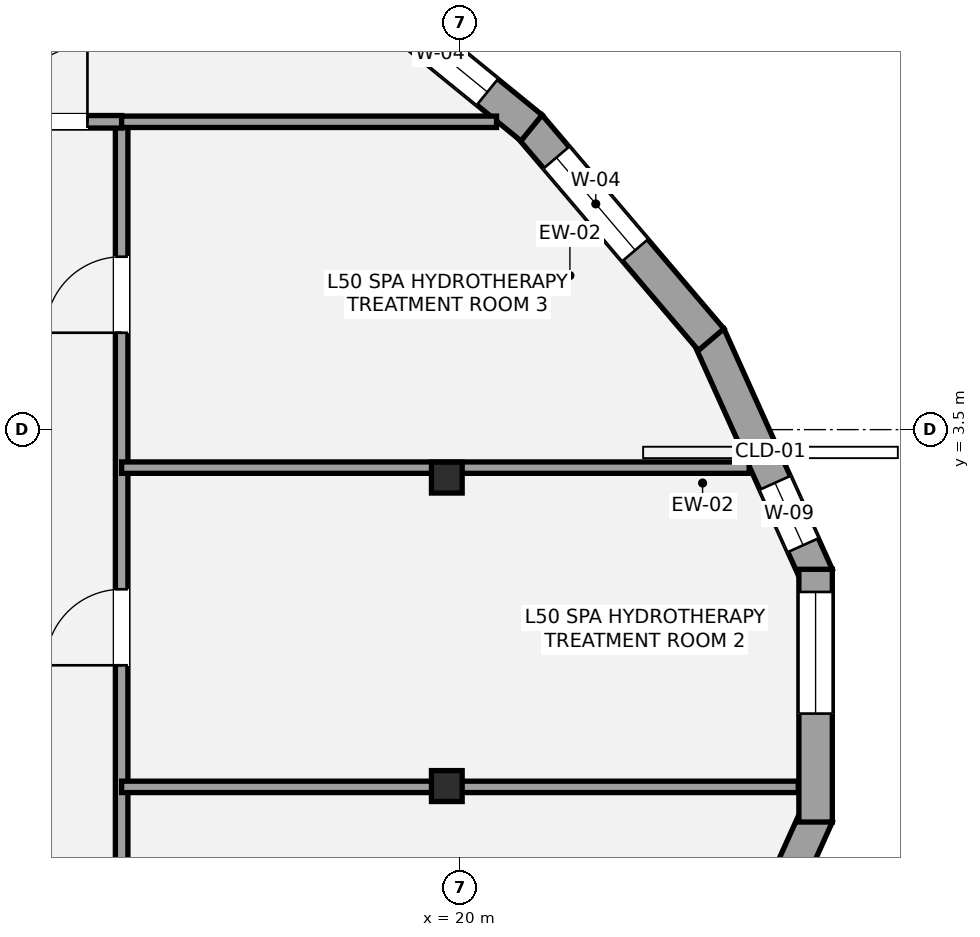
"""IFC4 building model, lengths in metres.
Left out: names, types, materials, properties, quantities, classifications, styles, units other than length and angle.
Written with IfcOpenShell. Run it as: python <this file> out.ifc"""

import sys

from ifc_helpers import new_model, si_unit, direction, frame, frame_2d, origin, origin_2d, place, context, subcontext, project, spatial, rectangle, i_section, extrude, element, fill, save


model = new_model("IFC4")
c1 = context("Model", 3, precision=1e-05, world=origin(), true_north=direction((0.0, 1.0)))
c2 = subcontext(c1, "Body", "Model", "MODEL_VIEW")
j1 = project(units=[si_unit("LENGTHUNIT", "METRE"), si_unit("PLANEANGLEUNIT", "RADIAN")], contexts=[c1])
p1 = place(None, origin())
s1 = spatial("IfcSite", under=j1, at=p1, CompositionType="ELEMENT")
p2 = place(p1, origin())
s2 = spatial("IfcBuilding", under=s1, at=p2, CompositionType="ELEMENT")
p3 = place(p2, frame((0.0, 0.0, 182.2)))
s3 = spatial("IfcBuildingStorey", under=s2, at=p3, CompositionType="ELEMENT", Elevation=182.2)
for number, where, z_axis, x_axis in (
    (1, (19.828, 2.869, 0.0), (0.0, 0.0, 1.0), (1.0, 0.0, 0.0)),
    (2, (19.828, -1.189, 0.0), (0.0, 0.0, 1.0), (1.0, 0.0, 0.0)),
):
    element("IfcColumn", number, at=place(p3, frame(where, z_axis=z_axis, x_axis=x_axis)), inside=s3, PredefinedType="COLUMN", context=c2, shape_type="SweptSolid", body=[
        extrude(i_section(OverallWidth=0.404, OverallDepth=0.407, WebThickness=0.027, FlangeThickness=0.044, at=origin_2d()), origin(), (0.0, 0.0, 1.0), 3.2),
    ])
p4 = place(p3, frame((23.274, 4.737, 0.0), z_axis=(0.0, 0.0, 1.0), x_axis=(0.410812065386, -0.911720048553, 0.0)))
e3 = element("IfcWall", 3, at=p4, inside=s3, PredefinedType="STANDARD", context=c2, shape_type="SweptSolid", body=[
    extrude(rectangle(XDim=3.471, YDim=0.44, at=frame_2d((1.736, 0.0))), origin(), (0.0, 0.0, 1.0), 2.315),
])
p5 = place(p4, frame((2.125, 0.0, 0.58)))
e4 = element("IfcOpeningElement", 4, at=p5, cuts=e3, PredefinedType="OPENING", context=c2, shape_type="SweptSolid", body=[
    extrude(rectangle(XDim=0.9, YDim=1.35, at=frame_2d((0.45, 0.675))), frame((0.0, 0.23, 0.0), z_axis=(0.0, -1.0, 0.0), x_axis=(1.0, 0.0, 0.0)), (0.0, 0.0, 1.0), 0.46),
])
p6 = place(p3, frame((20.914, 7.497, 0.0), z_axis=(0.0, 0.0, 1.0), x_axis=(0.648014991522, -0.761627580096, 0.0)))
e5 = element("IfcWall", 5, at=p6, inside=s3, PredefinedType="STANDARD", context=c2, shape_type="SweptSolid", body=[
    extrude(rectangle(XDim=3.692, YDim=0.44, at=frame_2d((1.846, 0.0))), origin(), (0.0, 0.0, 1.0), 2.315),
])
p7 = place(p6, frame((0.548, 0.0, 0.58)))
e6 = element("IfcOpeningElement", 6, at=p7, cuts=e5, PredefinedType="OPENING", context=c2, shape_type="SweptSolid", body=[
    extrude(rectangle(XDim=1.6, YDim=1.55, at=frame_2d((0.8, 0.775))), frame((0.0, 0.23, 0.0), z_axis=(0.0, -1.0, 0.0), x_axis=(1.0, 0.0, 0.0)), (0.0, 0.0, 1.0), 0.46),
])
p8 = place(p3, frame((17.96, 9.899, 0.0), z_axis=(0.0, 0.0, 1.0), x_axis=(0.77522232587, -0.631688487684, 0.0)))
e7 = element("IfcWall", 7, at=p8, inside=s3, PredefinedType="STANDARD", context=c2, shape_type="SweptSolid", body=[
    extrude(rectangle(XDim=3.847, YDim=0.44, at=frame_2d((1.924, 0.0))), origin(), (0.0, 0.0, 1.0), 2.315),
])
p9 = place(p8, frame((1.498, 0.0, 0.58)))
e8 = element("IfcOpeningElement", 8, at=p9, cuts=e7, PredefinedType="OPENING", context=c2, shape_type="SweptSolid", body=[
    extrude(rectangle(XDim=1.6, YDim=1.55, at=frame_2d((0.8, 0.775))), frame((0.0, 0.23, 0.0), z_axis=(0.0, -1.0, 0.0), x_axis=(1.0, 0.0, 0.0)), (0.0, 0.0, 1.0), 0.46),
])
p10 = place(p3, frame((24.7, -1.572, 0.0), z_axis=(0.0, 0.0, 1.0), x_axis=(-0.410812065386, -0.911720048553, 0.0)))
e9 = element("IfcWall", 9, at=p10, inside=s3, PredefinedType="STANDARD", context=c2, shape_type="SweptSolid", body=[
    extrude(rectangle(XDim=3.471, YDim=0.44, at=frame_2d((1.736, 0.0))), origin(), (0.0, 0.0, 1.0), 2.315),
])
p11 = place(p10, frame((1.426, 0.0, 0.58)))
e10 = element("IfcOpeningElement", 10, at=p11, cuts=e9, PredefinedType="OPENING", context=c2, shape_type="SweptSolid", body=[
    extrude(rectangle(XDim=1.6, YDim=1.55, at=frame_2d((0.8, 0.775))), frame((0.0, 0.23, 0.0), z_axis=(0.0, -1.0, 0.0), x_axis=(1.0, 0.0, 0.0)), (0.0, 0.0, 1.0), 0.46),
])
p12 = place(p3, frame((24.68, 1.663, 0.0), z_axis=(0.0, 0.0, 1.0), x_axis=(0.0, -1.0, 0.0)))
e11 = element("IfcWall", 11, at=p12, inside=s3, PredefinedType="STANDARD", context=c2, shape_type="SweptSolid", body=[
    extrude(rectangle(XDim=3.325, YDim=0.44, at=frame_2d((1.663, 0.0))), origin(), (0.0, 0.0, 1.0), 2.315),
])
p13 = place(p12, frame((0.298, 0.0, 0.58)))
e12 = element("IfcOpeningElement", 12, at=p13, cuts=e11, PredefinedType="OPENING", context=c2, shape_type="SweptSolid", body=[
    extrude(rectangle(XDim=1.6, YDim=1.55, at=frame_2d((0.8, 0.775))), frame((0.0, 0.23, 0.0), z_axis=(0.0, -1.0, 0.0), x_axis=(1.0, 0.0, 0.0)), (0.0, 0.0, 1.0), 0.46),
])
p14 = place(p3, frame((15.55, -11.257, 0.0), z_axis=(0.0, 0.0, 1.0), x_axis=(0.0, 1.0, 0.0)))
e13 = element("IfcWall", 13, at=p14, inside=s3, PredefinedType="PARTITIONING", context=c2, shape_type="SweptSolid", body=[
    extrude(rectangle(XDim=18.807, YDim=0.165, at=frame_2d((9.403, 0.0))), origin(), (0.0, 0.0, 1.0), 2.473),
])
p15 = place(p14, frame((4.106, 0.0, 0.0)))
e14 = element("IfcOpeningElement", 14, at=p15, cuts=e13, PredefinedType="OPENING", context=c2, shape_type="SweptSolid", body=[
    extrude(rectangle(XDim=0.85, YDim=2.1, at=frame_2d((0.425, 1.05))), frame((0.0, 0.093, 0.0), z_axis=(0.0, -1.0, 0.0), x_axis=(1.0, 0.0, 0.0)), (0.0, 0.0, 1.0), 0.185),
])
p16 = place(p14, frame((7.257, 0.0, 0.0)))
e15 = element("IfcOpeningElement", 15, at=p16, cuts=e13, PredefinedType="OPENING", context=c2, shape_type="SweptSolid", body=[
    extrude(rectangle(XDim=1.0, YDim=2.15, at=frame_2d((0.5, 1.075))), frame((0.0, 0.093, 0.0), z_axis=(0.0, -1.0, 0.0), x_axis=(1.0, 0.0, 0.0)), (0.0, 0.0, 1.0), 0.185),
])
p17 = place(p14, frame((11.656, 0.0, 0.0)))
e16 = element("IfcOpeningElement", 16, at=p17, cuts=e13, PredefinedType="OPENING", context=c2, shape_type="SweptSolid", body=[
    extrude(rectangle(XDim=1.0, YDim=2.15, at=frame_2d((0.5, 1.075))), frame((0.0, 0.093, 0.0), z_axis=(0.0, -1.0, 0.0), x_axis=(1.0, 0.0, 0.0)), (0.0, 0.0, 1.0), 0.185),
])
p18 = place(p14, frame((16.031, 0.0, 0.0)))
e17 = element("IfcOpeningElement", 17, at=p18, cuts=e13, PredefinedType="OPENING", context=c2, shape_type="SweptSolid", body=[
    extrude(rectangle(XDim=1.0, YDim=2.15, at=frame_2d((0.5, 1.075))), frame((0.0, 0.093, 0.0), z_axis=(0.0, -1.0, 0.0), x_axis=(1.0, 0.0, 0.0)), (0.0, 0.0, 1.0), 0.185),
])
p19 = place(p3, frame((13.8, 7.55, 0.0), z_axis=(0.0, 0.0, 1.0), x_axis=(1.0, 0.0, 0.0)))
e18 = element("IfcWall", 18, at=p19, inside=s3, PredefinedType="PARTITIONING", context=c2, shape_type="SweptSolid", body=[
    extrude(rectangle(XDim=1.75, YDim=0.165, at=frame_2d((0.875, 0.0))), origin(), (0.0, 0.0, 1.0), 3.02),
])
p20 = place(p19, frame((0.3, 0.0, 0.0)))
e19 = element("IfcOpeningElement", 19, at=p20, cuts=e18, PredefinedType="OPENING", context=c2, shape_type="SweptSolid", body=[
    extrude(rectangle(XDim=1.0, YDim=2.15, at=frame_2d((0.5, 1.075))), frame((0.0, 0.093, 0.0), z_axis=(0.0, -1.0, 0.0), x_axis=(1.0, 0.0, 0.0)), (0.0, 0.0, 1.0), 0.185),
])
p21 = place(p3, frame((15.55, 7.55, 0.0), z_axis=(0.0, 0.0, 1.0), x_axis=(1.0, 0.0, 0.0)))
e20 = element("IfcWall", 20, at=p21, inside=s3, PredefinedType="PLUMBINGWALL", context=c2, shape_type="SweptSolid", body=[
    extrude(rectangle(XDim=4.932, YDim=0.15, at=frame_2d((2.466, 0.0))), origin(), (0.0, 0.0, 1.0), 2.473),
])
p22 = place(p3, frame((15.55, -1.2, 0.0), z_axis=(0.0, 0.0, 1.0), x_axis=(1.0, 0.0, 0.0)))
e21 = element("IfcWall", 21, at=p22, inside=s3, PredefinedType="PLUMBINGWALL", context=c2, shape_type="SweptSolid", body=[
    extrude(rectangle(XDim=8.902, YDim=0.15, at=frame_2d((4.451, 0.0))), origin(), (0.0, 0.0, 1.0), 2.398),
])
p23 = place(p3, frame((15.55, 3.0, 0.0), z_axis=(0.0, 0.0, 1.0), x_axis=(1.0, 0.0, 0.0)))
e22 = element("IfcWall", 22, at=p23, inside=s3, PredefinedType="PLUMBINGWALL", context=c2, shape_type="SweptSolid", body=[
    extrude(rectangle(XDim=8.256, YDim=0.15, at=frame_2d((4.128, 0.0))), origin(), (0.0, 0.0, 1.0), 2.473),
])
p24 = place(p5, origin())
e23 = element("IfcWindow", 23, at=p24, inside=s3, PartitioningType="SINGLE_PANEL", PredefinedType="WINDOW", context=c2, shape_type="SweptSolid", body=[
    extrude(rectangle(XDim=0.9, YDim=1.35, at=frame_2d((0.45, 0.675))), frame((0.0, -0.01, 0.0), z_axis=(0.0, -1.0, 0.0), x_axis=(1.0, 0.0, 0.0)), (0.0, 0.0, 1.0), 0.06),
])
fill(e4, e23)
p25 = place(p7, origin())
e24 = element("IfcWindow", 24, at=p25, inside=s3, PartitioningType="SINGLE_PANEL", PredefinedType="WINDOW", context=c2, shape_type="SweptSolid", body=[
    extrude(rectangle(XDim=1.6, YDim=1.55, at=frame_2d((0.8, 0.775))), frame((0.0, -0.01, 0.0), z_axis=(0.0, -1.0, 0.0), x_axis=(1.0, 0.0, 0.0)), (0.0, 0.0, 1.0), 0.06),
])
fill(e6, e24)
p26 = place(p9, origin())
e25 = element("IfcWindow", 25, at=p26, inside=s3, PartitioningType="SINGLE_PANEL", PredefinedType="WINDOW", context=c2, shape_type="SweptSolid", body=[
    extrude(rectangle(XDim=1.6, YDim=1.55, at=frame_2d((0.8, 0.775))), frame((0.0, -0.01, 0.0), z_axis=(0.0, -1.0, 0.0), x_axis=(1.0, 0.0, 0.0)), (0.0, 0.0, 1.0), 0.06),
])
fill(e8, e25)
p27 = place(p13, origin())
e26 = element("IfcWindow", 26, at=p27, inside=s3, PartitioningType="SINGLE_PANEL", PredefinedType="WINDOW", context=c2, shape_type="SweptSolid", body=[
    extrude(rectangle(XDim=1.6, YDim=1.55, at=frame_2d((0.8, 0.775))), frame((0.0, -0.01, 0.0), z_axis=(0.0, -1.0, 0.0), x_axis=(1.0, 0.0, 0.0)), (0.0, 0.0, 1.0), 0.06),
])
fill(e12, e26)
p28 = place(p20, origin())
e27 = element("IfcDoor", 27, at=p28, inside=s3, OperationType="SINGLE_SWING_RIGHT", PredefinedType="DOOR", context=c2, shape_type="SweptSolid", body=[
    extrude(rectangle(XDim=1.0, YDim=2.15, at=frame_2d((0.5, 1.075))), frame((0.0, 0.025, 0.0), z_axis=(0.0, -1.0, 0.0), x_axis=(1.0, 0.0, 0.0)), (0.0, 0.0, 1.0), 0.05),
])
fill(e19, e27)
p29 = place(p17, origin())
e28 = element("IfcDoor", 28, at=p29, inside=s3, OperationType="SINGLE_SWING_LEFT", PredefinedType="DOOR", context=c2, shape_type="SweptSolid", body=[
    extrude(rectangle(XDim=1.0, YDim=2.15, at=frame_2d((0.5, 1.075))), frame((0.0, 0.025, 0.0), z_axis=(0.0, -1.0, 0.0), x_axis=(1.0, 0.0, 0.0)), (0.0, 0.0, 1.0), 0.05),
])
fill(e16, e28)
p30 = place(p18, origin())
e29 = element("IfcDoor", 29, at=p30, inside=s3, OperationType="SINGLE_SWING_LEFT", PredefinedType="DOOR", context=c2, shape_type="SweptSolid", body=[
    extrude(rectangle(XDim=1.0, YDim=2.15, at=frame_2d((0.5, 1.075))), frame((0.0, 0.025, 0.0), z_axis=(0.0, -1.0, 0.0), x_axis=(1.0, 0.0, 0.0)), (0.0, 0.0, 1.0), 0.05),
])
fill(e17, e29)
save(model, sys.argv[1])
